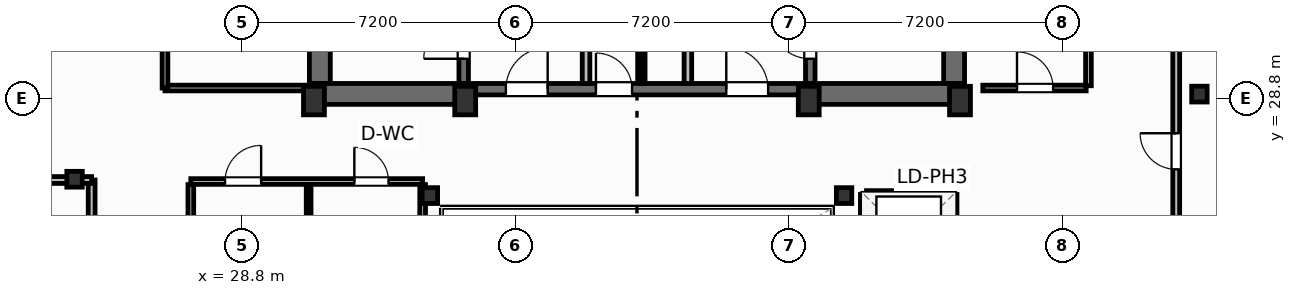
"""IFC4 building model, lengths in metres.
Left out: names, types, materials, properties, quantities, classifications, styles, units other than length and angle.
Written with IfcOpenShell. Run it as: python <this file> out.ifc"""

import sys

from ifc_helpers import new_model, si_unit, direction, frame, frame_2d, origin, origin_2d, place, context, subcontext, project, spatial, rectangle, i_section, extrude, element, fill, save


model = new_model("IFC4")
c1 = context("Model", 3, precision=1e-05, world=origin(), true_north=direction((0.0, 1.0)))
c2 = subcontext(c1, "Body", "Model", "MODEL_VIEW")
j1 = project(units=[si_unit("LENGTHUNIT", "METRE"), si_unit("PLANEANGLEUNIT", "RADIAN")], contexts=[c1])
p1 = place(None, origin())
s1 = spatial("IfcSite", under=j1, at=p1, CompositionType="ELEMENT")
p2 = place(p1, origin())
s2 = spatial("IfcBuilding", under=s1, at=p2, CompositionType="ELEMENT")
p3 = place(p2, frame((0.0, 0.0, 265.6)))
s3 = spatial("IfcBuildingStorey", under=s2, at=p3, CompositionType="ELEMENT", Elevation=265.6)
for number, where, z_axis, x_axis in (
    (1, (30.7, 28.75, 0.0), (0.0, 0.0, 1.0), (1.0, 0.0, 0.0)),
    (2, (34.68, 28.75, 0.0), (0.0, 0.0, 1.0), (1.0, 0.0, 0.0)),
    (3, (43.72, 28.75, 0.0), (0.0, 0.0, 1.0), (1.0, 0.0, 0.0)),
    (4, (47.7, 28.75, 0.0), (0.0, 0.0, 1.0), (1.0, 0.0, 0.0)),
):
    element("IfcColumn", number, at=place(p3, frame(where, z_axis=z_axis, x_axis=x_axis)), inside=s3, PredefinedType="COLUMN", context=c2, shape_type="SweptSolid", body=[
        extrude(rectangle(XDim=0.55, YDim=0.75, at=origin_2d()), origin(), (0.0, 0.0, 1.0), 3.7),
    ])
for number, where, z_axis, x_axis in (
    (5, (33.75, 26.25, 0.0), (0.0, 0.0, 1.0), (1.0, 0.0, 0.0)),
    (6, (44.65, 26.25, 0.0), (0.0, 0.0, 1.0), (1.0, 0.0, 0.0)),
    (7, (24.4, 26.68, 0.0), (0.0, 0.0, 1.0), (1.0, 0.0, 0.0)),
    (8, (54.0, 28.92, 0.0), (0.0, 0.0, 1.0), (1.0, 0.0, 0.0)),
):
    element("IfcColumn", number, at=place(p3, frame(where, z_axis=z_axis, x_axis=x_axis)), inside=s3, PredefinedType="COLUMN", context=c2, shape_type="SweptSolid", body=[
        extrude(i_section(OverallWidth=0.406, OverallDepth=0.416, WebThickness=0.03, FlangeThickness=0.048, FilletRadius=0.025, at=origin_2d()), origin(), (0.0, 0.0, 1.0), 3.7),
    ])
for number, where, z_axis, x_axis in (
    (9, (30.855, 29.2, 0.0), (0.0, 0.0, 1.0), (0.0, 1.0, 0.0)),
    (10, (47.545, 29.2, 0.0), (0.0, 0.0, 1.0), (0.0, 1.0, 0.0)),
):
    element("IfcWall", number, at=place(p3, frame(where, z_axis=z_axis, x_axis=x_axis)), inside=s3, PredefinedType="SHEAR", context=c2, shape_type="SweptSolid", body=[
        extrude(rectangle(XDim=9.22, YDim=0.55, at=frame_2d((4.61, 0.0))), origin(), (0.0, 0.0, 1.0), 3.45),
    ])
for number, where, z_axis, x_axis in (
    (11, (30.58, 28.925, 0.0), (0.0, 0.0, 1.0), (1.0, 0.0, 0.0)),
    (12, (43.6, 28.925, 0.0), (0.0, 0.0, 1.0), (1.0, 0.0, 0.0)),
):
    element("IfcWall", number, at=place(p3, frame(where, z_axis=z_axis, x_axis=x_axis)), inside=s3, PredefinedType="SHEAR", context=c2, shape_type="SweptSolid", body=[
        extrude(rectangle(XDim=4.22, YDim=0.55, at=frame_2d((2.11, 0.0))), origin(), (0.0, 0.0, 1.0), 3.45),
    ])
p4 = place(p3, frame((34.8, 29.05, 0.0), z_axis=(0.0, 0.0, 1.0), x_axis=(1.0, 0.0, 0.0)))
e13 = element("IfcWall", 13, at=p4, inside=s3, PredefinedType="SHEAR", context=c2, shape_type="SweptSolid", body=[
    extrude(rectangle(XDim=8.8, YDim=0.3, at=frame_2d((4.4, 0.0))), origin(), (0.0, 0.0, 1.0), 3.45),
])
p5 = place(p4, frame((0.95, 0.0, 0.0)))
e14 = element("IfcOpeningElement", 14, at=p5, cuts=e13, PredefinedType="OPENING", context=c2, shape_type="SweptSolid", body=[
    extrude(rectangle(XDim=1.1, YDim=2.15, at=frame_2d((0.55, 1.075))), frame((0.0, 0.16, 0.0), z_axis=(0.0, -1.0, 0.0), x_axis=(1.0, 0.0, 0.0)), (0.0, 0.0, 1.0), 0.32),
])
p6 = place(p4, frame((6.75, 0.0, 0.0)))
e15 = element("IfcOpeningElement", 15, at=p6, cuts=e13, PredefinedType="OPENING", context=c2, shape_type="SweptSolid", body=[
    extrude(rectangle(XDim=1.1, YDim=2.15, at=frame_2d((0.55, 1.075))), frame((0.0, 0.16, 0.0), z_axis=(0.0, -1.0, 0.0), x_axis=(1.0, 0.0, 0.0)), (0.0, 0.0, 1.0), 0.32),
])
p7 = place(p4, frame((3.32, 0.0, 0.0)))
e16 = element("IfcOpeningElement", 16, at=p7, cuts=e13, PredefinedType="OPENING", context=c2, shape_type="SweptSolid", body=[
    extrude(rectangle(XDim=0.95, YDim=2.15, at=frame_2d((0.475, 1.075))), frame((0.0, 0.16, 0.0), z_axis=(0.0, -1.0, 0.0), x_axis=(1.0, 0.0, 0.0)), (0.0, 0.0, 1.0), 0.32),
])
p8 = place(p3, frame((34.64, 29.2, 0.0), z_axis=(0.0, 0.0, 1.0), x_axis=(0.0, 1.0, 0.0)))
e17 = element("IfcWall", 17, at=p8, inside=s3, PredefinedType="SHEAR", context=c2, shape_type="SweptSolid", body=[
    extrude(rectangle(XDim=9.22, YDim=0.25, at=frame_2d((4.61, 0.0))), origin(), (0.0, 0.0, 1.0), 3.45),
])
p9 = place(p8, frame((0.65, 0.0, 0.0)))
e18 = element("IfcOpeningElement", 18, at=p9, cuts=e17, PredefinedType="OPENING", context=c2, shape_type="SweptSolid", body=[
    extrude(rectangle(XDim=1.05, YDim=2.15, at=frame_2d((0.525, 1.075))), frame((0.0, 0.135, 0.0), z_axis=(0.0, -1.0, 0.0), x_axis=(1.0, 0.0, 0.0)), (0.0, 0.0, 1.0), 0.27),
])
p10 = place(p3, frame((43.76, 29.2, 0.0), z_axis=(0.0, 0.0, 1.0), x_axis=(0.0, 1.0, 0.0)))
e19 = element("IfcWall", 19, at=p10, inside=s3, PredefinedType="SHEAR", context=c2, shape_type="SweptSolid", body=[
    extrude(rectangle(XDim=9.22, YDim=0.25, at=frame_2d((4.61, 0.0))), origin(), (0.0, 0.0, 1.0), 3.45),
])
p11 = place(p10, frame((0.65, 0.0, 0.0)))
e20 = element("IfcOpeningElement", 20, at=p11, cuts=e19, PredefinedType="OPENING", context=c2, shape_type="SweptSolid", body=[
    extrude(rectangle(XDim=1.05, YDim=2.15, at=frame_2d((0.525, 1.075))), frame((0.0, 0.135, 0.0), z_axis=(0.0, -1.0, 0.0), x_axis=(1.0, 0.0, 0.0)), (0.0, 0.0, 1.0), 0.27),
])
p12 = place(p3, frame((24.85, 19.24, 0.0), z_axis=(0.0, 0.0, 1.0), x_axis=(0.0, 1.0, 0.0)))
e21 = element("IfcWall", 21, at=p12, inside=s3, PredefinedType="PARTITIONING", context=c2, shape_type="SweptSolid", body=[
    extrude(rectangle(XDim=7.42, YDim=0.18, at=frame_2d((3.71, 0.0))), origin(), (0.0, 0.0, 1.0), 3.45),
])
p13 = place(p12, frame((2.4, 0.0, 0.0)))
e22 = element("IfcOpeningElement", 22, at=p13, cuts=e21, PredefinedType="OPENING", context=c2, shape_type="SweptSolid", body=[
    extrude(rectangle(XDim=0.92, YDim=2.05, at=frame_2d((0.46, 1.025))), frame((0.0, 0.1, 0.0), z_axis=(0.0, -1.0, 0.0), x_axis=(1.0, 0.0, 0.0)), (0.0, 0.0, 1.0), 0.2),
])
p14 = place(p3, frame((5.107, 26.66, 0.0), z_axis=(0.0, 0.0, 1.0), x_axis=(1.0, 0.0, 0.0)))
e23 = element("IfcWall", 23, at=p14, inside=s3, PredefinedType="PARTITIONING", context=c2, shape_type="SweptSolid", body=[
    extrude(rectangle(XDim=19.743, YDim=0.18, at=frame_2d((9.872, 0.0))), origin(), (0.0, 0.0, 1.0), 2.662),
])
p15 = place(p3, frame((53.39, 19.24, 0.0), z_axis=(0.0, 0.0, 1.0), x_axis=(0.0, 1.0, 0.0)))
e24 = element("IfcWall", 24, at=p15, inside=s3, PredefinedType="PARTITIONING", context=c2, shape_type="SweptSolid", body=[
    extrude(rectangle(XDim=20.06, YDim=0.18, at=frame_2d((10.03, 0.0))), origin(), (0.0, 0.0, 1.0), 3.45),
])
p16 = place(p15, frame((7.7, 0.0, 0.0)))
e25 = element("IfcOpeningElement", 25, at=p16, cuts=e24, PredefinedType="OPENING", context=c2, shape_type="SweptSolid", body=[
    extrude(rectangle(XDim=0.95, YDim=2.05, at=frame_2d((0.475, 1.025))), frame((0.0, 0.1, 0.0), z_axis=(0.0, -1.0, 0.0), x_axis=(1.0, 0.0, 0.0)), (0.0, 0.0, 1.0), 0.2),
])
for number, where, z_axis, x_axis in (
    (26, (37.86, 29.2, 0.0), (0.0, 0.0, 1.0), (0.0, 1.0, 0.0)),
    (27, (40.54, 29.2, 0.0), (0.0, 0.0, 1.0), (0.0, 1.0, 0.0)),
):
    element("IfcWall", number, at=place(p3, frame(where, z_axis=z_axis, x_axis=x_axis)), inside=s3, PredefinedType="PARTITIONING", context=c2, shape_type="SweptSolid", body=[
        extrude(rectangle(XDim=5.18, YDim=0.2, at=frame_2d((2.59, 0.0))), origin(), (0.0, 0.0, 1.0), 3.45),
    ])
p17 = place(p3, frame((39.35, 29.2, 0.0), z_axis=(0.0, 0.0, 1.0), x_axis=(0.0, 1.0, 0.0)))
e28 = element("IfcWall", 28, at=p17, inside=s3, PredefinedType="PARTITIONING", context=c2, shape_type="SweptSolid", body=[
    extrude(rectangle(XDim=5.22, YDim=0.125, at=frame_2d((2.61, 0.0))), origin(), (0.0, 0.0, 1.0), 3.45),
])
p18 = place(p17, frame((2.05, 0.0, 0.0)))
e29 = element("IfcOpeningElement", 29, at=p18, cuts=e28, PredefinedType="OPENING", context=c2, shape_type="SweptSolid", body=[
    extrude(rectangle(XDim=0.85, YDim=2.05, at=frame_2d((0.425, 1.025))), frame((0.0, 0.073, 0.0), z_axis=(0.0, -1.0, 0.0), x_axis=(1.0, 0.0, 0.0)), (0.0, 0.0, 1.0), 0.145),
])
p19 = place(p3, frame((27.46, 26.62, 0.0), z_axis=(0.0, 0.0, 1.0), x_axis=(1.0, 0.0, 0.0)))
e30 = element("IfcWall", 30, at=p19, inside=s3, PredefinedType="PARTITIONING", context=c2, shape_type="SweptSolid", body=[
    extrude(rectangle(XDim=6.1, YDim=0.15, at=frame_2d((3.05, 0.0))), origin(), (0.0, 0.0, 1.0), 2.662),
])
p20 = place(p19, frame((0.9, 0.0, 0.0)))
e31 = element("IfcOpeningElement", 31, at=p20, cuts=e30, PredefinedType="OPENING", context=c2, shape_type="SweptSolid", body=[
    extrude(rectangle(XDim=0.95, YDim=2.05, at=frame_2d((0.475, 1.025))), frame((0.0, 0.085, 0.0), z_axis=(0.0, -1.0, 0.0), x_axis=(1.0, 0.0, 0.0)), (0.0, 0.0, 1.0), 0.17),
])
p21 = place(p19, frame((4.303, 0.0, 0.0)))
e32 = element("IfcOpeningElement", 32, at=p21, cuts=e30, PredefinedType="OPENING", context=c2, shape_type="SweptSolid", body=[
    extrude(rectangle(XDim=0.9, YDim=2.05, at=frame_2d((0.45, 1.025))), frame((0.0, 0.085, 0.0), z_axis=(0.0, -1.0, 0.0), x_axis=(1.0, 0.0, 0.0)), (0.0, 0.0, 1.0), 0.17),
])
p22 = place(p3, frame((30.56, 19.38, 0.0), z_axis=(0.0, 0.0, 1.0), x_axis=(0.0, 1.0, 0.0)))
e33 = element("IfcWall", 33, at=p22, inside=s3, PredefinedType="PARTITIONING", context=c2, shape_type="SweptSolid", body=[
    extrude(rectangle(XDim=7.16, YDim=0.125, at=frame_2d((3.58, 0.0))), origin(), (0.0, 0.0, 1.0), 3.45),
])
p23 = place(p22, frame((1.4, 0.0, 0.0)))
e34 = element("IfcOpeningElement", 34, at=p23, cuts=e33, PredefinedType="OPENING", context=c2, shape_type="SweptSolid", body=[
    extrude(rectangle(XDim=0.92, YDim=2.05, at=frame_2d((0.46, 1.025))), frame((0.0, 0.073, 0.0), z_axis=(0.0, -1.0, 0.0), x_axis=(1.0, 0.0, 0.0)), (0.0, 0.0, 1.0), 0.145),
])
p24 = place(p3, frame((27.46, 19.38, 0.0), z_axis=(0.0, 0.0, 1.0), x_axis=(0.0, 1.0, 0.0)))
e35 = element("IfcWall", 35, at=p24, inside=s3, PredefinedType="PARTITIONING", context=c2, shape_type="SweptSolid", body=[
    extrude(rectangle(XDim=7.16, YDim=0.15, at=frame_2d((3.58, 0.0))), origin(), (0.0, 0.0, 1.0), 3.45),
])
p25 = place(p3, frame((33.56, 19.38, 0.0), z_axis=(0.0, 0.0, 1.0), x_axis=(0.0, 1.0, 0.0)))
e36 = element("IfcWall", 36, at=p25, inside=s3, PredefinedType="PARTITIONING", context=c2, shape_type="SweptSolid", body=[
    extrude(rectangle(XDim=7.16, YDim=0.15, at=frame_2d((3.58, 0.0))), origin(), (0.0, 0.0, 1.0), 2.824),
])
p26 = place(p3, frame((26.78, 29.08, 0.0), z_axis=(0.0, 0.0, 1.0), x_axis=(1.0, 0.0, 0.0)))
e37 = element("IfcWall", 37, at=p26, inside=s3, PredefinedType="PARTITIONING", context=c2, shape_type="SweptSolid", body=[
    extrude(rectangle(XDim=3.8, YDim=0.15, at=frame_2d((1.9, 0.0))), origin(), (0.0, 0.0, 1.0), 3.45),
])
p27 = place(p3, frame((26.78, 29.08, 0.0), z_axis=(0.0, 0.0, 1.0), x_axis=(0.0, 1.0, 0.0)))
e38 = element("IfcWall", 38, at=p27, inside=s3, PredefinedType="PARTITIONING", context=c2, shape_type="SweptSolid", body=[
    extrude(rectangle(XDim=9.18, YDim=0.15, at=frame_2d((4.59, 0.0))), origin(), (0.0, 0.0, 1.0), 3.45),
])
p28 = place(p27, frame((2.4, 0.0, 0.0)))
e39 = element("IfcOpeningElement", 39, at=p28, cuts=e38, PredefinedType="OPENING", context=c2, shape_type="SweptSolid", body=[
    extrude(rectangle(XDim=0.95, YDim=2.05, at=frame_2d((0.475, 1.025))), frame((0.0, 0.085, 0.0), z_axis=(0.0, -1.0, 0.0), x_axis=(1.0, 0.0, 0.0)), (0.0, 0.0, 1.0), 0.17),
])
p29 = place(p3, frame((48.3, 29.08, 0.0), z_axis=(0.0, 0.0, 1.0), x_axis=(1.0, 0.0, 0.0)))
e40 = element("IfcWall", 40, at=p29, inside=s3, PredefinedType="PARTITIONING", context=c2, shape_type="SweptSolid", body=[
    extrude(rectangle(XDim=2.72, YDim=0.15, at=frame_2d((1.36, 0.0))), origin(), (0.0, 0.0, 1.0), 2.662),
])
p30 = place(p29, frame((0.9, 0.0, 0.0)))
e41 = element("IfcOpeningElement", 41, at=p30, cuts=e40, PredefinedType="OPENING", context=c2, shape_type="SweptSolid", body=[
    extrude(rectangle(XDim=0.95, YDim=2.05, at=frame_2d((0.475, 1.025))), frame((0.0, 0.085, 0.0), z_axis=(0.0, -1.0, 0.0), x_axis=(1.0, 0.0, 0.0)), (0.0, 0.0, 1.0), 0.17),
])
p31 = place(p3, frame((51.08, 29.14, 0.0), z_axis=(0.0, 0.0, 1.0), x_axis=(0.0, 1.0, 0.0)))
e42 = element("IfcWall", 42, at=p31, inside=s3, PredefinedType="PARTITIONING", context=c2, shape_type="SweptSolid", body=[
    extrude(rectangle(XDim=6.76, YDim=0.15, at=frame_2d((3.38, 0.0))), origin(), (0.0, 0.0, 1.0), 3.45),
])
p32 = place(p3, frame((45.24, 26.28, 0.0), z_axis=(0.0, 0.0, 1.0), x_axis=(1.0, 0.0, 0.0)))
e43 = element("IfcWall", 43, at=p32, inside=s3, PredefinedType="PARTITIONING", context=c2, shape_type="SweptSolid", body=[
    extrude(rectangle(XDim=2.22, YDim=0.2, at=frame_2d((1.11, 0.0))), origin(), (0.0, 0.0, 1.0), 3.45),
])
p33 = place(p3, frame((45.18, 19.38, 0.0), z_axis=(0.0, 0.0, 1.0), x_axis=(0.0, 1.0, 0.0)))
e44 = element("IfcWall", 44, at=p33, inside=s3, PredefinedType="PARTITIONING", context=c2, shape_type="SweptSolid", body=[
    extrude(rectangle(XDim=6.9, YDim=0.2, at=frame_2d((3.45, 0.0))), origin(), (0.0, 0.0, 1.0), 3.45),
])
p34 = place(p3, frame((47.52, 19.38, 0.0), z_axis=(0.0, 0.0, 1.0), x_axis=(0.0, 1.0, 0.0)))
e45 = element("IfcWall", 45, at=p34, inside=s3, PredefinedType="PARTITIONING", context=c2, shape_type="SweptSolid", body=[
    extrude(rectangle(XDim=6.9, YDim=0.2, at=frame_2d((3.45, 0.0))), origin(), (0.0, 0.0, 1.0), 3.45),
])
p35 = place(p34, frame((0.59, 0.0, 0.0)))
e46 = element("IfcOpeningElement", 46, at=p35, cuts=e45, PredefinedType="OPENING", context=c2, shape_type="SweptSolid", body=[
    extrude(rectangle(XDim=1.1, YDim=2.15, at=frame_2d((0.55, 1.075))), frame((0.0, 0.11, 0.0), z_axis=(0.0, -1.0, 0.0), x_axis=(1.0, 0.0, 0.0)), (0.0, 0.0, 1.0), 0.22),
])
p36 = place(p34, frame((2.89, 0.0, 0.0)))
e47 = element("IfcOpeningElement", 47, at=p36, cuts=e45, PredefinedType="OPENING", context=c2, shape_type="SweptSolid", body=[
    extrude(rectangle(XDim=1.1, YDim=2.15, at=frame_2d((0.55, 1.075))), frame((0.0, 0.11, 0.0), z_axis=(0.0, -1.0, 0.0), x_axis=(1.0, 0.0, 0.0)), (0.0, 0.0, 1.0), 0.22),
])
p37 = place(p34, frame((5.19, 0.0, 0.0)))
e48 = element("IfcOpeningElement", 48, at=p37, cuts=e45, PredefinedType="OPENING", context=c2, shape_type="SweptSolid", body=[
    extrude(rectangle(XDim=1.1, YDim=2.15, at=frame_2d((0.55, 1.075))), frame((0.0, 0.11, 0.0), z_axis=(0.0, -1.0, 0.0), x_axis=(1.0, 0.0, 0.0)), (0.0, 0.0, 1.0), 0.22),
])
p38 = place(p16, origin())
e49 = element("IfcDoor", 49, at=p38, inside=s3, OperationType="SINGLE_SWING_RIGHT", PredefinedType="DOOR", context=c2, shape_type="SweptSolid", body=[
    extrude(rectangle(XDim=0.95, YDim=2.05, at=frame_2d((0.475, 1.025))), frame((0.0, 0.025, 0.0), z_axis=(0.0, -1.0, 0.0), x_axis=(1.0, 0.0, 0.0)), (0.0, 0.0, 1.0), 0.05),
])
fill(e25, e49)
p39 = place(p9, origin())
e50 = element("IfcDoor", 50, at=p39, inside=s3, OperationType="SINGLE_SWING_LEFT", PredefinedType="DOOR", context=c2, shape_type="SweptSolid", body=[
    extrude(rectangle(XDim=1.05, YDim=2.15, at=frame_2d((0.525, 1.075))), frame((0.0, 0.025, 0.0), z_axis=(0.0, -1.0, 0.0), x_axis=(1.0, 0.0, 0.0)), (0.0, 0.0, 1.0), 0.05),
])
fill(e18, e50)
p40 = place(p11, origin())
e51 = element("IfcDoor", 51, at=p40, inside=s3, OperationType="SINGLE_SWING_RIGHT", PredefinedType="DOOR", context=c2, shape_type="SweptSolid", body=[
    extrude(rectangle(XDim=1.05, YDim=2.15, at=frame_2d((0.525, 1.075))), frame((0.0, 0.025, 0.0), z_axis=(0.0, -1.0, 0.0), x_axis=(1.0, 0.0, 0.0)), (0.0, 0.0, 1.0), 0.05),
])
fill(e20, e51)
p41 = place(p5, origin())
e52 = element("IfcDoor", 52, at=p41, inside=s3, OperationType="SINGLE_SWING_RIGHT", PredefinedType="DOOR", context=c2, shape_type="SweptSolid", body=[
    extrude(rectangle(XDim=1.1, YDim=2.15, at=frame_2d((0.55, 1.075))), frame((0.0, 0.025, 0.0), z_axis=(0.0, -1.0, 0.0), x_axis=(1.0, 0.0, 0.0)), (0.0, 0.0, 1.0), 0.05),
])
fill(e14, e52)
p42 = place(p6, origin())
e53 = element("IfcDoor", 53, at=p42, inside=s3, OperationType="SINGLE_SWING_LEFT", PredefinedType="DOOR", context=c2, shape_type="SweptSolid", body=[
    extrude(rectangle(XDim=1.1, YDim=2.15, at=frame_2d((0.55, 1.075))), frame((0.0, 0.025, 0.0), z_axis=(0.0, -1.0, 0.0), x_axis=(1.0, 0.0, 0.0)), (0.0, 0.0, 1.0), 0.05),
])
fill(e15, e53)
p43 = place(p7, origin())
e54 = element("IfcDoor", 54, at=p43, inside=s3, OperationType="SINGLE_SWING_LEFT", PredefinedType="DOOR", context=c2, shape_type="SweptSolid", body=[
    extrude(rectangle(XDim=0.95, YDim=2.15, at=frame_2d((0.475, 1.075))), frame((0.0, 0.025, 0.0), z_axis=(0.0, -1.0, 0.0), x_axis=(1.0, 0.0, 0.0)), (0.0, 0.0, 1.0), 0.05),
])
fill(e16, e54)
p44 = place(p20, origin())
e55 = element("IfcDoor", 55, at=p44, inside=s3, OperationType="SINGLE_SWING_RIGHT", PredefinedType="DOOR", context=c2, shape_type="SweptSolid", body=[
    extrude(rectangle(XDim=0.95, YDim=2.05, at=frame_2d((0.475, 1.025))), frame((0.0, 0.025, 0.0), z_axis=(0.0, -1.0, 0.0), x_axis=(1.0, 0.0, 0.0)), (0.0, 0.0, 1.0), 0.05),
])
fill(e31, e55)
p45 = place(p21, origin())
e56 = element("IfcDoor", 56, at=p45, inside=s3, OperationType="SINGLE_SWING_LEFT", PredefinedType="DOOR", context=c2, shape_type="SweptSolid", body=[
    extrude(rectangle(XDim=0.9, YDim=2.05, at=frame_2d((0.45, 1.025))), frame((0.0, 0.025, 0.0), z_axis=(0.0, -1.0, 0.0), x_axis=(1.0, 0.0, 0.0)), (0.0, 0.0, 1.0), 0.05),
])
fill(e32, e56)
p46 = place(p30, origin())
e57 = element("IfcDoor", 57, at=p46, inside=s3, OperationType="SINGLE_SWING_LEFT", PredefinedType="DOOR", context=c2, shape_type="SweptSolid", body=[
    extrude(rectangle(XDim=0.95, YDim=2.05, at=frame_2d((0.475, 1.025))), frame((0.0, 0.025, 0.0), z_axis=(0.0, -1.0, 0.0), x_axis=(1.0, 0.0, 0.0)), (0.0, 0.0, 1.0), 0.05),
])
fill(e41, e57)
save(model, sys.argv[1])
